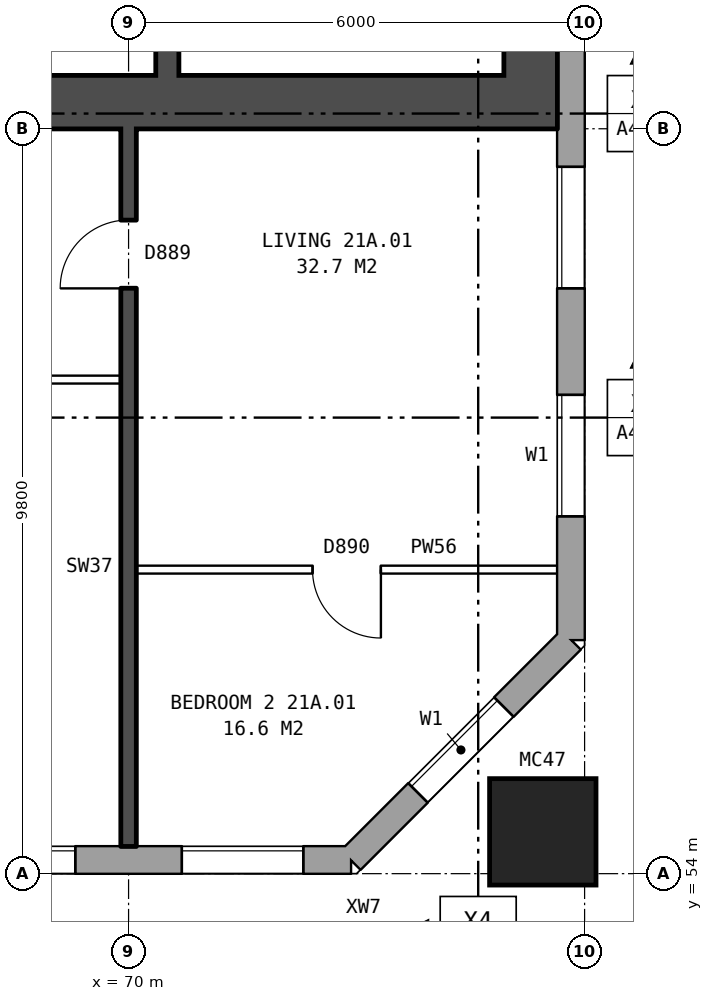
"""IFC4 building model, lengths in metres.
Left out: names, types, materials, properties, quantities, classifications, styles, units other than length and angle.
Written with IfcOpenShell. Run it as: python <this file> out.ifc"""

import sys

from ifc_helpers import new_model, si_unit, direction, frame, frame_2d, origin, origin_2d, place, context, subcontext, project, spatial, rectangle, hollow_rectangle, extrude, element, fill, save


model = new_model("IFC4")
c1 = context("Model", 3, precision=1e-05, world=origin(), true_north=direction((0.0, 1.0)))
c2 = subcontext(c1, "Body", "Model", "MODEL_VIEW")
j1 = project(units=[si_unit("LENGTHUNIT", "METRE"), si_unit("PLANEANGLEUNIT", "RADIAN")], contexts=[c1])
p1 = place(None, origin())
s1 = spatial("IfcSite", under=j1, at=p1, CompositionType="ELEMENT")
p2 = place(p1, origin())
s2 = spatial("IfcBuilding", under=s1, at=p2, CompositionType="ELEMENT")
p3 = place(p2, frame((0.0, 0.0, 77.8)))
s3 = spatial("IfcBuildingStorey", under=s2, at=p3, CompositionType="ELEMENT", Elevation=77.8)
p4 = place(p3, frame((75.45, 54.55, 0.0), z_axis=(0.0, 0.0, 1.0), x_axis=(1.0, 0.0, 0.0)))
e1 = element("IfcColumn", 1, at=p4, inside=s3, PredefinedType="COLUMN", context=c2, shape_type="SweptSolid", body=[
    extrude(hollow_rectangle(XDim=1.4, YDim=1.4, WallThickness=0.075, at=origin_2d()), origin(), (0.0, 0.0, 1.0), 3.1),
])
p5 = place(p3, frame((26.325, 54.18, 0.0), z_axis=(0.0, 0.0, 1.0), x_axis=(1.0, 0.0, 0.0)))
e2 = element("IfcWall", 2, at=p5, inside=s3, PredefinedType="STANDARD", context=c2, shape_type="SweptSolid", body=[
    extrude(rectangle(XDim=46.601, YDim=0.36, at=frame_2d((23.3, 0.0))), origin(), (0.0, 0.0, 1.0), 2.85),
])
p6 = place(p5, frame((2.375, 0.0, 0.8)))
e3 = element("IfcOpeningElement", 3, at=p6, cuts=e2, PredefinedType="OPENING", context=c2, shape_type="SweptSolid", body=[
    extrude(rectangle(XDim=1.6, YDim=1.8, at=frame_2d((0.8, 0.9))), frame((0.0, 0.19, 0.0), z_axis=(0.0, -1.0, 0.0), x_axis=(1.0, 0.0, 0.0)), (0.0, 0.0, 1.0), 0.38),
])
p7 = place(p5, frame((5.375, 0.0, 0.8)))
e4 = element("IfcOpeningElement", 4, at=p7, cuts=e2, PredefinedType="OPENING", context=c2, shape_type="SweptSolid", body=[
    extrude(rectangle(XDim=1.6, YDim=1.8, at=frame_2d((0.8, 0.9))), frame((0.0, 0.19, 0.0), z_axis=(0.0, -1.0, 0.0), x_axis=(1.0, 0.0, 0.0)), (0.0, 0.0, 1.0), 0.38),
])
p8 = place(p5, frame((7.875, 0.0, 0.8)))
e5 = element("IfcOpeningElement", 5, at=p8, cuts=e2, PredefinedType="OPENING", context=c2, shape_type="SweptSolid", body=[
    extrude(rectangle(XDim=1.6, YDim=1.8, at=frame_2d((0.8, 0.9))), frame((0.0, 0.19, 0.0), z_axis=(0.0, -1.0, 0.0), x_axis=(1.0, 0.0, 0.0)), (0.0, 0.0, 1.0), 0.38),
])
p9 = place(p5, frame((11.725, 0.0, 0.65)))
e6 = element("IfcOpeningElement", 6, at=p9, cuts=e2, PredefinedType="OPENING", context=c2, shape_type="SweptSolid", body=[
    extrude(rectangle(XDim=0.8, YDim=0.9, at=frame_2d((0.4, 0.45))), frame((0.0, 0.19, 0.0), z_axis=(0.0, -1.0, 0.0), x_axis=(1.0, 0.0, 0.0)), (0.0, 0.0, 1.0), 0.38),
])
p10 = place(p5, frame((14.375, 0.0, 0.8)))
e7 = element("IfcOpeningElement", 7, at=p10, cuts=e2, PredefinedType="OPENING", context=c2, shape_type="SweptSolid", body=[
    extrude(rectangle(XDim=1.6, YDim=1.8, at=frame_2d((0.8, 0.9))), frame((0.0, 0.19, 0.0), z_axis=(0.0, -1.0, 0.0), x_axis=(1.0, 0.0, 0.0)), (0.0, 0.0, 1.0), 0.38),
])
p11 = place(p5, frame((17.375, 0.0, 0.8)))
e8 = element("IfcOpeningElement", 8, at=p11, cuts=e2, PredefinedType="OPENING", context=c2, shape_type="SweptSolid", body=[
    extrude(rectangle(XDim=1.6, YDim=1.8, at=frame_2d((0.8, 0.9))), frame((0.0, 0.19, 0.0), z_axis=(0.0, -1.0, 0.0), x_axis=(1.0, 0.0, 0.0)), (0.0, 0.0, 1.0), 0.38),
])
p12 = place(p5, frame((20.375, 0.0, 0.8)))
e9 = element("IfcOpeningElement", 9, at=p12, cuts=e2, PredefinedType="OPENING", context=c2, shape_type="SweptSolid", body=[
    extrude(rectangle(XDim=1.6, YDim=1.8, at=frame_2d((0.8, 0.9))), frame((0.0, 0.19, 0.0), z_axis=(0.0, -1.0, 0.0), x_axis=(1.0, 0.0, 0.0)), (0.0, 0.0, 1.0), 0.38),
])
p13 = place(p5, frame((23.375, 0.0, 0.8)))
e10 = element("IfcOpeningElement", 10, at=p13, cuts=e2, PredefinedType="OPENING", context=c2, shape_type="SweptSolid", body=[
    extrude(rectangle(XDim=1.6, YDim=1.8, at=frame_2d((0.8, 0.9))), frame((0.0, 0.19, 0.0), z_axis=(0.0, -1.0, 0.0), x_axis=(1.0, 0.0, 0.0)), (0.0, 0.0, 1.0), 0.38),
])
p14 = place(p5, frame((26.375, 0.0, 0.8)))
e11 = element("IfcOpeningElement", 11, at=p14, cuts=e2, PredefinedType="OPENING", context=c2, shape_type="SweptSolid", body=[
    extrude(rectangle(XDim=1.6, YDim=1.8, at=frame_2d((0.8, 0.9))), frame((0.0, 0.19, 0.0), z_axis=(0.0, -1.0, 0.0), x_axis=(1.0, 0.0, 0.0)), (0.0, 0.0, 1.0), 0.38),
])
p15 = place(p5, frame((29.375, 0.0, 0.8)))
e12 = element("IfcOpeningElement", 12, at=p15, cuts=e2, PredefinedType="OPENING", context=c2, shape_type="SweptSolid", body=[
    extrude(rectangle(XDim=1.6, YDim=1.8, at=frame_2d((0.8, 0.9))), frame((0.0, 0.19, 0.0), z_axis=(0.0, -1.0, 0.0), x_axis=(1.0, 0.0, 0.0)), (0.0, 0.0, 1.0), 0.38),
])
p16 = place(p5, frame((32.375, 0.0, 0.8)))
e13 = element("IfcOpeningElement", 13, at=p16, cuts=e2, PredefinedType="OPENING", context=c2, shape_type="SweptSolid", body=[
    extrude(rectangle(XDim=1.6, YDim=1.8, at=frame_2d((0.8, 0.9))), frame((0.0, 0.19, 0.0), z_axis=(0.0, -1.0, 0.0), x_axis=(1.0, 0.0, 0.0)), (0.0, 0.0, 1.0), 0.38),
])
p17 = place(p5, frame((34.825, 0.0, 0.15)))
e14 = element("IfcOpeningElement", 14, at=p17, cuts=e2, PredefinedType="OPENING", context=c2, shape_type="SweptSolid", body=[
    extrude(rectangle(XDim=0.6, YDim=0.9, at=frame_2d((0.3, 0.45))), frame((0.0, 0.19, 0.0), z_axis=(0.0, -1.0, 0.0), x_axis=(1.0, 0.0, 0.0)), (0.0, 0.0, 1.0), 0.38),
])
p18 = place(p5, frame((38.375, 0.0, 0.8)))
e15 = element("IfcOpeningElement", 15, at=p18, cuts=e2, PredefinedType="OPENING", context=c2, shape_type="SweptSolid", body=[
    extrude(rectangle(XDim=1.6, YDim=1.8, at=frame_2d((0.8, 0.9))), frame((0.0, 0.19, 0.0), z_axis=(0.0, -1.0, 0.0), x_axis=(1.0, 0.0, 0.0)), (0.0, 0.0, 1.0), 0.38),
])
p19 = place(p5, frame((41.375, 0.0, 0.8)))
e16 = element("IfcOpeningElement", 16, at=p19, cuts=e2, PredefinedType="OPENING", context=c2, shape_type="SweptSolid", body=[
    extrude(rectangle(XDim=1.6, YDim=1.8, at=frame_2d((0.8, 0.9))), frame((0.0, 0.19, 0.0), z_axis=(0.0, -1.0, 0.0), x_axis=(1.0, 0.0, 0.0)), (0.0, 0.0, 1.0), 0.38),
])
p20 = place(p5, frame((44.375, 0.0, 0.8)))
e17 = element("IfcOpeningElement", 17, at=p20, cuts=e2, PredefinedType="OPENING", context=c2, shape_type="SweptSolid", body=[
    extrude(rectangle(XDim=1.6, YDim=1.8, at=frame_2d((0.8, 0.9))), frame((0.0, 0.19, 0.0), z_axis=(0.0, -1.0, 0.0), x_axis=(1.0, 0.0, 0.0)), (0.0, 0.0, 1.0), 0.38),
])
p21 = place(p5, frame((9.775, 0.0, 1.5)))
e18 = element("IfcOpeningElement", 18, at=p21, cuts=e2, PredefinedType="OPENING", context=c2, shape_type="SweptSolid", body=[
    extrude(rectangle(XDim=0.6, YDim=0.9, at=frame_2d((0.3, 0.45))), frame((0.0, 0.19, 0.0), z_axis=(0.0, -1.0, 0.0), x_axis=(1.0, 0.0, 0.0)), (0.0, 0.0, 1.0), 0.38),
])
p22 = place(p5, frame((12.825, 0.0, 0.65)))
e19 = element("IfcOpeningElement", 19, at=p22, cuts=e2, PredefinedType="OPENING", context=c2, shape_type="SweptSolid", body=[
    extrude(rectangle(XDim=0.6, YDim=1.8, at=frame_2d((0.3, 0.9))), frame((0.0, 0.19, 0.0), z_axis=(0.0, -1.0, 0.0), x_axis=(1.0, 0.0, 0.0)), (0.0, 0.0, 1.0), 0.38),
])
p23 = place(p5, frame((36.025, 0.0, 1.65)))
e20 = element("IfcOpeningElement", 20, at=p23, cuts=e2, PredefinedType="OPENING", context=c2, shape_type="SweptSolid", body=[
    extrude(rectangle(XDim=1.4, YDim=0.9, at=frame_2d((0.7, 0.45))), frame((0.0, 0.19, 0.0), z_axis=(0.0, -1.0, 0.0), x_axis=(1.0, 0.0, 0.0)), (0.0, 0.0, 1.0), 0.38),
])
p24 = place(p3, frame((72.925, 54.18, 0.0), z_axis=(0.0, 0.0, 1.0), x_axis=(0.707106781187, 0.707106781187, 0.0)))
e21 = element("IfcWall", 21, at=p24, inside=s3, PredefinedType="STANDARD", context=c2, shape_type="SweptSolid", body=[
    extrude(rectangle(XDim=4.094, YDim=0.36, at=frame_2d((2.047, 0.0))), origin(), (0.0, 0.0, 1.0), 2.85),
])
p25 = place(p24, frame((1.247, 0.0, 0.8)))
e22 = element("IfcOpeningElement", 22, at=p25, cuts=e21, PredefinedType="OPENING", context=c2, shape_type="SweptSolid", body=[
    extrude(rectangle(XDim=1.6, YDim=1.8, at=frame_2d((0.8, 0.9))), frame((0.0, 0.19, 0.0), z_axis=(0.0, -1.0, 0.0), x_axis=(1.0, 0.0, 0.0)), (0.0, 0.0, 1.0), 0.38),
])
p26 = place(p3, frame((75.82, 57.075, 0.0), z_axis=(0.0, 0.0, 1.0), x_axis=(0.0, 1.0, 0.0)))
e23 = element("IfcWall", 23, at=p26, inside=s3, PredefinedType="STANDARD", context=c2, shape_type="SweptSolid", body=[
    extrude(rectangle(XDim=25.851, YDim=0.36, at=frame_2d((12.925, 0.0))), origin(), (0.0, 0.0, 1.0), 2.85),
])
p27 = place(p26, frame((1.625, 0.0, 0.8)))
e24 = element("IfcOpeningElement", 24, at=p27, cuts=e23, PredefinedType="OPENING", context=c2, shape_type="SweptSolid", body=[
    extrude(rectangle(XDim=1.6, YDim=1.8, at=frame_2d((0.8, 0.9))), frame((0.0, 0.19, 0.0), z_axis=(0.0, -1.0, 0.0), x_axis=(1.0, 0.0, 0.0)), (0.0, 0.0, 1.0), 0.38),
])
p28 = place(p26, frame((4.625, 0.0, 0.8)))
e25 = element("IfcOpeningElement", 25, at=p28, cuts=e23, PredefinedType="OPENING", context=c2, shape_type="SweptSolid", body=[
    extrude(rectangle(XDim=1.6, YDim=1.8, at=frame_2d((0.8, 0.9))), frame((0.0, 0.19, 0.0), z_axis=(0.0, -1.0, 0.0), x_axis=(1.0, 0.0, 0.0)), (0.0, 0.0, 1.0), 0.38),
])
p29 = place(p26, frame((19.625, 0.0, 0.8)))
e26 = element("IfcOpeningElement", 26, at=p29, cuts=e23, PredefinedType="OPENING", context=c2, shape_type="SweptSolid", body=[
    extrude(rectangle(XDim=1.6, YDim=1.8, at=frame_2d((0.8, 0.9))), frame((0.0, 0.19, 0.0), z_axis=(0.0, -1.0, 0.0), x_axis=(1.0, 0.0, 0.0)), (0.0, 0.0, 1.0), 0.38),
])
p30 = place(p26, frame((22.625, 0.0, 0.8)))
e27 = element("IfcOpeningElement", 27, at=p30, cuts=e23, PredefinedType="OPENING", context=c2, shape_type="SweptSolid", body=[
    extrude(rectangle(XDim=1.6, YDim=1.8, at=frame_2d((0.8, 0.9))), frame((0.0, 0.19, 0.0), z_axis=(0.0, -1.0, 0.0), x_axis=(1.0, 0.0, 0.0)), (0.0, 0.0, 1.0), 0.38),
])
p31 = place(p3, frame((75.29, 64.5, 0.0), z_axis=(0.0, 0.0, 1.0), x_axis=(0.0, 1.0, 0.0)))
e28 = element("IfcWall", 28, at=p31, inside=s3, PredefinedType="SHEAR", context=c2, shape_type="SweptSolid", body=[
    extrude(rectangle(XDim=11.0, YDim=0.7, at=frame_2d((5.5, 0.0))), origin(), (0.0, 0.0, 1.0), 2.85),
])
p32 = place(p3, frame((66.64, 64.15, 0.0), z_axis=(0.0, 0.0, 1.0), x_axis=(1.0, 0.0, 0.0)))
e29 = element("IfcWall", 29, at=p32, inside=s3, PredefinedType="SHEAR", context=c2, shape_type="SweptSolid", body=[
    extrude(rectangle(XDim=9.0, YDim=0.7, at=frame_2d((4.5, 0.0))), origin(), (0.0, 0.0, 1.0), 2.85),
])
p33 = place(p3, frame((70.51, 64.5, 0.0), z_axis=(0.0, 0.0, 1.0), x_axis=(0.0, 1.0, 0.0)))
e30 = element("IfcWall", 30, at=p33, inside=s3, PredefinedType="SHEAR", context=c2, shape_type="SweptSolid", body=[
    extrude(rectangle(XDim=2.2, YDim=0.3, at=frame_2d((1.1, 0.0))), origin(), (0.0, 0.0, 1.0), 2.85),
])
p34 = place(p3, frame((70.1, 58.0, 0.0), z_axis=(0.0, 0.0, 1.0), x_axis=(1.0, 0.0, 0.0)))
e31 = element("IfcWall", 31, at=p34, inside=s3, PredefinedType="PARTITIONING", context=c2, shape_type="SweptSolid", body=[
    extrude(rectangle(XDim=5.54, YDim=0.1, at=frame_2d((2.77, 0.0))), origin(), (0.0, 0.0, 1.0), 2.85),
])
p35 = place(p34, frame((2.32, 0.0, 0.0)))
e32 = element("IfcOpeningElement", 32, at=p35, cuts=e31, PredefinedType="OPENING", context=c2, shape_type="SweptSolid", body=[
    extrude(rectangle(XDim=0.9, YDim=2.1, at=frame_2d((0.45, 1.05))), frame((0.0, 0.06, 0.0), z_axis=(0.0, -1.0, 0.0), x_axis=(1.0, 0.0, 0.0)), (0.0, 0.0, 1.0), 0.12),
])
p36 = place(p3, frame((64.1, 60.5, 0.0), z_axis=(0.0, 0.0, 1.0), x_axis=(1.0, 0.0, 0.0)))
e33 = element("IfcWall", 33, at=p36, inside=s3, PredefinedType="PARTITIONING", context=c2, shape_type="SweptSolid", body=[
    extrude(rectangle(XDim=5.8, YDim=0.1, at=frame_2d((2.9, 0.0))), origin(), (0.0, 0.0, 1.0), 2.85),
])
p37 = place(p36, frame((3.6, 0.0, 0.0)))
e34 = element("IfcOpeningElement", 34, at=p37, cuts=e33, PredefinedType="OPENING", context=c2, shape_type="SweptSolid", body=[
    extrude(rectangle(XDim=0.9, YDim=2.1, at=frame_2d((0.45, 1.05))), frame((0.0, 0.06, 0.0), z_axis=(0.0, -1.0, 0.0), x_axis=(1.0, 0.0, 0.0)), (0.0, 0.0, 1.0), 0.12),
])
p38 = place(p36, frame((0.7, 0.0, 0.0)))
e35 = element("IfcOpeningElement", 35, at=p38, cuts=e33, PredefinedType="OPENING", context=c2, shape_type="SweptSolid", body=[
    extrude(rectangle(XDim=0.9, YDim=2.1, at=frame_2d((0.45, 1.05))), frame((0.0, 0.06, 0.0), z_axis=(0.0, -1.0, 0.0), x_axis=(1.0, 0.0, 0.0)), (0.0, 0.0, 1.0), 0.12),
])
p39 = place(p3, frame((70.0, 54.36, 0.0), z_axis=(0.0, 0.0, 1.0), x_axis=(0.0, 1.0, 0.0)))
e36 = element("IfcWall", 36, at=p39, inside=s3, PredefinedType="SOLIDWALL", context=c2, shape_type="SweptSolid", body=[
    extrude(rectangle(XDim=9.44, YDim=0.2, at=frame_2d((4.72, 0.0))), origin(), (0.0, 0.0, 1.0), 2.85),
])
p40 = place(p39, frame((7.34, 0.0, 0.0)))
e37 = element("IfcOpeningElement", 37, at=p40, cuts=e36, PredefinedType="OPENING", context=c2, shape_type="SweptSolid", body=[
    extrude(rectangle(XDim=0.9, YDim=2.1, at=frame_2d((0.45, 1.05))), frame((0.0, 0.11, 0.0), z_axis=(0.0, -1.0, 0.0), x_axis=(1.0, 0.0, 0.0)), (0.0, 0.0, 1.0), 0.22),
])
p41 = place(p19, origin())
e38 = element("IfcWindow", 38, at=p41, inside=s3, PartitioningType="SINGLE_PANEL", PredefinedType="WINDOW", context=c2, shape_type="SweptSolid", body=[
    extrude(rectangle(XDim=1.6, YDim=1.8, at=frame_2d((0.8, 0.9))), frame((0.0, 0.15, 0.0), z_axis=(0.0, -1.0, 0.0), x_axis=(1.0, 0.0, 0.0)), (0.0, 0.0, 1.0), 0.06),
])
fill(e16, e38)
p42 = place(p20, origin())
e39 = element("IfcWindow", 39, at=p42, inside=s3, PartitioningType="SINGLE_PANEL", PredefinedType="WINDOW", context=c2, shape_type="SweptSolid", body=[
    extrude(rectangle(XDim=1.6, YDim=1.8, at=frame_2d((0.8, 0.9))), frame((0.0, 0.15, 0.0), z_axis=(0.0, -1.0, 0.0), x_axis=(1.0, 0.0, 0.0)), (0.0, 0.0, 1.0), 0.06),
])
fill(e17, e39)
p43 = place(p25, origin())
e40 = element("IfcWindow", 40, at=p43, inside=s3, PartitioningType="SINGLE_PANEL", PredefinedType="WINDOW", context=c2, shape_type="SweptSolid", body=[
    extrude(rectangle(XDim=1.6, YDim=1.8, at=frame_2d((0.8, 0.9))), frame((0.0, 0.15, 0.0), z_axis=(0.0, -1.0, 0.0), x_axis=(1.0, 0.0, 0.0)), (0.0, 0.0, 1.0), 0.06),
])
fill(e22, e40)
p44 = place(p27, origin())
e41 = element("IfcWindow", 41, at=p44, inside=s3, PartitioningType="SINGLE_PANEL", PredefinedType="WINDOW", context=c2, shape_type="SweptSolid", body=[
    extrude(rectangle(XDim=1.6, YDim=1.8, at=frame_2d((0.8, 0.9))), frame((0.0, 0.15, 0.0), z_axis=(0.0, -1.0, 0.0), x_axis=(1.0, 0.0, 0.0)), (0.0, 0.0, 1.0), 0.06),
])
fill(e24, e41)
p45 = place(p28, origin())
e42 = element("IfcWindow", 42, at=p45, inside=s3, PartitioningType="SINGLE_PANEL", PredefinedType="WINDOW", context=c2, shape_type="SweptSolid", body=[
    extrude(rectangle(XDim=1.6, YDim=1.8, at=frame_2d((0.8, 0.9))), frame((0.0, 0.15, 0.0), z_axis=(0.0, -1.0, 0.0), x_axis=(1.0, 0.0, 0.0)), (0.0, 0.0, 1.0), 0.06),
])
fill(e25, e42)
p46 = place(p35, frame((0.9, 0.0, 0.0), z_axis=(0.0, 0.0, 1.0), x_axis=(-1.0, 0.0, 0.0)))
e43 = element("IfcDoor", 43, at=p46, inside=s3, OperationType="SINGLE_SWING_LEFT", PredefinedType="DOOR", context=c2, shape_type="SweptSolid", body=[
    extrude(rectangle(XDim=0.9, YDim=2.1, at=frame_2d((0.45, 1.05))), frame((0.0, 0.025, 0.0), z_axis=(0.0, -1.0, 0.0), x_axis=(1.0, 0.0, 0.0)), (0.0, 0.0, 1.0), 0.05),
])
fill(e32, e43)
p47 = place(p40, origin())
e44 = element("IfcDoor", 44, at=p47, inside=s3, OperationType="SINGLE_SWING_LEFT", PredefinedType="DOOR", context=c2, shape_type="SweptSolid", body=[
    extrude(rectangle(XDim=0.9, YDim=2.1, at=frame_2d((0.45, 1.05))), frame((0.0, 0.025, 0.0), z_axis=(0.0, -1.0, 0.0), x_axis=(1.0, 0.0, 0.0)), (0.0, 0.0, 1.0), 0.05),
])
fill(e37, e44)
save(model, sys.argv[1])
